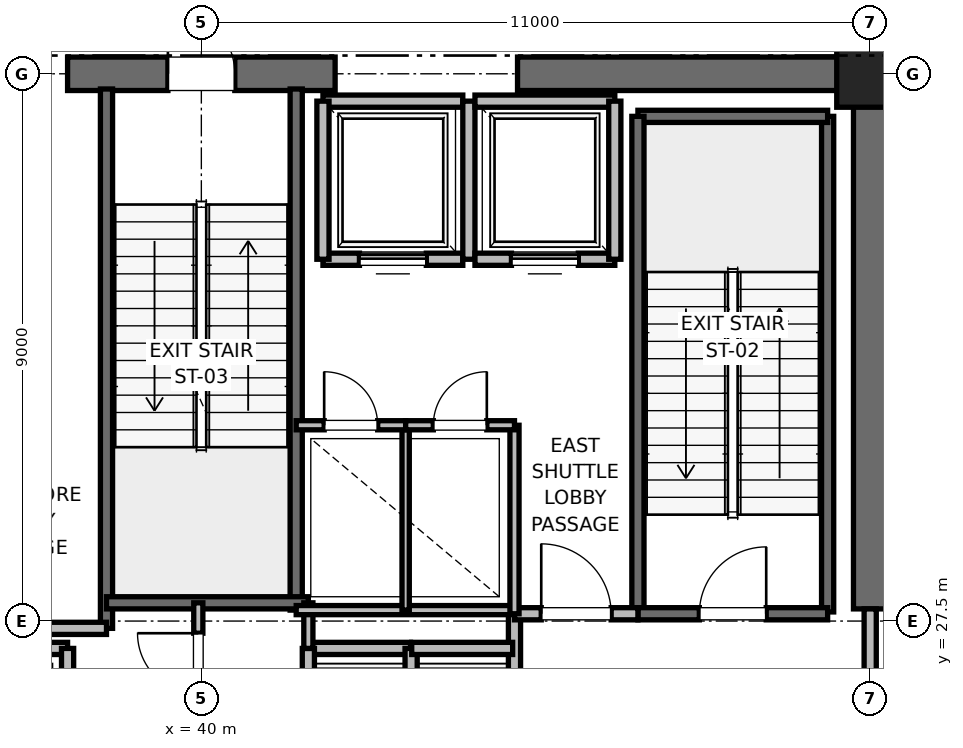
"""IFC4 building model, lengths in metres.
Left out: names, types, materials, properties, quantities, classifications, styles, units other than length and angle.
Written with IfcOpenShell. Run it as: python <this file> out.ifc"""

import sys

from ifc_helpers import new_model, si_unit, direction, frame, frame_2d, origin, origin_2d, place, context, subcontext, project, spatial, rectangle, extrude, element, fill, save


model = new_model("IFC4")
c1 = context("Model", 3, precision=1e-05, world=origin(), true_north=direction((0.0, 1.0)))
c2 = subcontext(c1, "Body", "Model", "MODEL_VIEW")
j1 = project(units=[si_unit("LENGTHUNIT", "METRE"), si_unit("PLANEANGLEUNIT", "RADIAN")], contexts=[c1])
p1 = place(None, origin())
s1 = spatial("IfcSite", under=j1, at=p1, CompositionType="ELEMENT")
p2 = place(p1, origin())
s2 = spatial("IfcBuilding", under=s1, at=p2, CompositionType="ELEMENT")
p3 = place(p2, frame((0.0, 0.0, 118.4)))
s3 = spatial("IfcBuildingStorey", under=s2, at=p3, CompositionType="ELEMENT", Elevation=118.4)
p4 = place(p3, frame((51.0, 36.5, 0.0), z_axis=(0.0, 0.0, 1.0), x_axis=(1.0, 0.0, 0.0)))
e1 = element("IfcColumn", 1, at=p4, inside=s3, PredefinedType="PILASTER", context=c2, shape_type="SweptSolid", body=[
    extrude(rectangle(XDim=1.1, YDim=1.1, at=origin_2d()), origin(), (0.0, 0.0, 1.0), 5.0),
])
p5 = place(p3, frame((37.8, 36.5, 0.0), z_axis=(0.0, 0.0, 1.0), x_axis=(1.0, 0.0, 0.0)))
e2 = element("IfcWall", 2, at=p5, inside=s3, PredefinedType="SHEAR", context=c2, shape_type="SweptSolid", body=[
    extrude(rectangle(XDim=4.4, YDim=0.55, at=frame_2d((2.2, 0.0))), origin(), (0.0, 0.0, 1.0), 4.7),
])
p6 = place(p5, frame((1.65, 0.0, 0.0)))
e3 = element("IfcOpeningElement", 3, at=p6, cuts=e2, PredefinedType="OPENING", context=c2, shape_type="SweptSolid", body=[
    extrude(rectangle(XDim=1.1, YDim=2.15, at=frame_2d((0.55, 1.075))), frame((0.0, 0.275, 0.0), z_axis=(0.0, -1.0, 0.0), x_axis=(1.0, 0.0, 0.0)), (0.0, 0.0, 1.0), 0.55),
])
p7 = place(p3, frame((45.2, 36.5, 0.0), z_axis=(0.0, 0.0, 1.0), x_axis=(1.0, 0.0, 0.0)))
e4 = element("IfcWall", 4, at=p7, inside=s3, PredefinedType="SHEAR", context=c2, shape_type="SweptSolid", body=[
    extrude(rectangle(XDim=5.8, YDim=0.55, at=frame_2d((2.9, 0.0))), origin(), (0.0, 0.0, 1.0), 4.7),
])
p8 = place(p3, frame((51.0, 27.7, 0.0), z_axis=(0.0, 0.0, 1.0), x_axis=(0.0, 1.0, 0.0)))
e5 = element("IfcWall", 5, at=p8, inside=s3, PredefinedType="SHEAR", context=c2, shape_type="SweptSolid", body=[
    extrude(rectangle(XDim=8.8, YDim=0.55, at=frame_2d((4.4, 0.0))), origin(), (0.0, 0.0, 1.0), 4.7),
])
p9 = place(p3, frame((50.3, 27.65, 0.0), z_axis=(0.0, 0.0, 1.0), x_axis=(0.0, 1.0, 0.0)))
e6 = element("IfcWall", 6, at=p9, inside=s3, PredefinedType="SOLIDWALL", context=c2, shape_type="SweptSolid", body=[
    extrude(rectangle(XDim=8.15, YDim=0.2, at=frame_2d((4.075, 0.0))), origin(), (0.0, 0.0, 1.0), 4.7),
])
p10 = place(p3, frame((47.18, 35.8, 0.0), z_axis=(0.0, 0.0, 1.0), x_axis=(1.0, 0.0, 0.0)))
e7 = element("IfcWall", 7, at=p10, inside=s3, PredefinedType="SOLIDWALL", context=c2, shape_type="SweptSolid", body=[
    extrude(rectangle(XDim=3.12, YDim=0.2, at=frame_2d((1.56, 0.0))), origin(), (0.0, 0.0, 1.0), 4.7),
])
p11 = place(p3, frame((47.18, 27.62, 0.0), z_axis=(0.0, 0.0, 1.0), x_axis=(0.0, 1.0, 0.0)))
e8 = element("IfcWall", 8, at=p11, inside=s3, PredefinedType="SOLIDWALL", context=c2, shape_type="SweptSolid", body=[
    extrude(rectangle(XDim=8.18, YDim=0.2, at=frame_2d((4.09, 0.0))), origin(), (0.0, 0.0, 1.0), 4.7),
])
p12 = place(p3, frame((47.18, 27.62, 0.0), z_axis=(0.0, 0.0, 1.0), x_axis=(1.0, 0.0, 0.0)))
e9 = element("IfcWall", 9, at=p12, inside=s3, PredefinedType="SOLIDWALL", context=c2, shape_type="SweptSolid", body=[
    extrude(rectangle(XDim=3.12, YDim=0.2, at=frame_2d((1.56, 0.0))), origin(), (0.0, 0.0, 1.0), 4.7),
])
p13 = place(p12, frame((1.01, 0.0, 0.0)))
e10 = element("IfcOpeningElement", 10, at=p13, cuts=e9, PredefinedType="OPENING", context=c2, shape_type="SweptSolid", body=[
    extrude(rectangle(XDim=1.1, YDim=2.15, at=frame_2d((0.55, 1.075))), frame((0.0, 0.1, 0.0), z_axis=(0.0, -1.0, 0.0), x_axis=(1.0, 0.0, 0.0)), (0.0, 0.0, 1.0), 0.2),
])
p14 = place(p3, frame((38.44, 27.38, 0.0), z_axis=(0.0, 0.0, 1.0), x_axis=(0.0, 1.0, 0.0)))
e11 = element("IfcWall", 11, at=p14, inside=s3, PredefinedType="SOLIDWALL", context=c2, shape_type="SweptSolid", body=[
    extrude(rectangle(XDim=8.87, YDim=0.2, at=frame_2d((4.435, 0.0))), origin(), (0.0, 0.0, 1.0), 4.7),
])
p15 = place(p3, frame((41.56, 27.68, 0.0), z_axis=(0.0, 0.0, 1.0), x_axis=(0.0, 1.0, 0.0)))
e12 = element("IfcWall", 12, at=p15, inside=s3, PredefinedType="SOLIDWALL", context=c2, shape_type="SweptSolid", body=[
    extrude(rectangle(XDim=8.57, YDim=0.2, at=frame_2d((4.285, 0.0))), origin(), (0.0, 0.0, 1.0), 4.7),
])
p16 = place(p3, frame((38.44, 27.8, 0.0), z_axis=(0.0, 0.0, 1.0), x_axis=(1.0, 0.0, 0.0)))
e13 = element("IfcWall", 13, at=p16, inside=s3, PredefinedType="SOLIDWALL", context=c2, shape_type="SweptSolid", body=[
    extrude(rectangle(XDim=3.32, YDim=0.2, at=frame_2d((1.66, 0.0))), origin(), (0.0, 0.0, 1.0), 4.7),
])
p17 = place(p3, frame((32.82, 27.38, 0.0), z_axis=(0.0, 0.0, 1.0), x_axis=(1.0, 0.0, 0.0)))
e14 = element("IfcWall", 14, at=p17, inside=s3, PredefinedType="PARTITIONING", context=c2, shape_type="SweptSolid", body=[
    extrude(rectangle(XDim=5.62, YDim=0.2, at=frame_2d((2.81, 0.0))), origin(), (0.0, 0.0, 1.0), 4.7),
])
p18 = place(p3, frame((45.15, 24.25, 0.0), z_axis=(0.0, 0.0, 1.0), x_axis=(0.0, 1.0, 0.0)))
e15 = element("IfcWall", 15, at=p18, inside=s3, PredefinedType="PARTITIONING", context=c2, shape_type="SweptSolid", body=[
    extrude(rectangle(XDim=3.37, YDim=0.2, at=frame_2d((1.685, 0.0))), origin(), (0.0, 0.0, 1.0), 4.7),
])
p19 = place(p3, frame((45.15, 27.62, 0.0), z_axis=(0.0, 0.0, 1.0), x_axis=(1.0, 0.0, 0.0)))
e16 = element("IfcWall", 16, at=p19, inside=s3, PredefinedType="PARTITIONING", context=c2, shape_type="SweptSolid", body=[
    extrude(rectangle(XDim=2.03, YDim=0.2, at=frame_2d((1.015, 0.0))), origin(), (0.0, 0.0, 1.0), 4.7),
])
p20 = place(p19, frame((0.44, 0.0, 0.0)))
e17 = element("IfcOpeningElement", 17, at=p20, cuts=e16, PredefinedType="OPENING", context=c2, shape_type="SweptSolid", body=[
    extrude(rectangle(XDim=1.15, YDim=2.2, at=frame_2d((0.575, 1.1))), frame((0.0, 0.1, 0.0), z_axis=(0.0, -1.0, 0.0), x_axis=(1.0, 0.0, 0.0)), (0.0, 0.0, 1.0), 0.2),
])
p21 = place(p3, frame((51.0, 24.3, 0.0), z_axis=(0.0, 0.0, 1.0), x_axis=(0.0, 1.0, 0.0)))
e18 = element("IfcWall", 18, at=p21, inside=s3, PredefinedType="PARTITIONING", context=c2, shape_type="SweptSolid", body=[
    extrude(rectangle(XDim=3.4, YDim=0.2, at=frame_2d((1.7, 0.0))), origin(), (0.0, 0.0, 1.0), 3.68),
])
p22 = place(p21, frame((1.125, 0.0, 0.0)))
e19 = element("IfcOpeningElement", 19, at=p22, cuts=e18, PredefinedType="OPENING", context=c2, shape_type="SweptSolid", body=[
    extrude(rectangle(XDim=1.15, YDim=2.2, at=frame_2d((0.575, 1.1))), frame((0.0, 0.1, 0.0), z_axis=(0.0, -1.0, 0.0), x_axis=(1.0, 0.0, 0.0)), (0.0, 0.0, 1.0), 0.2),
])
p23 = place(p3, frame((37.8, 27.05, 0.0), z_axis=(0.0, 0.0, 1.0), x_axis=(-1.0, 0.0, 0.0)))
e20 = element("IfcWall", 20, at=p23, inside=s3, PredefinedType="SOLIDWALL", context=c2, shape_type="SweptSolid", body=[
    extrude(rectangle(XDim=2.3, YDim=0.2, at=frame_2d((1.15, 0.0))), origin(), (0.0, 0.0, 1.0), 4.7),
])
p24 = place(p3, frame((37.8, 24.45, 0.0), z_axis=(0.0, 0.0, 1.0), x_axis=(0.0, 1.0, 0.0)))
e21 = element("IfcWall", 21, at=p24, inside=s3, PredefinedType="SOLIDWALL", context=c2, shape_type="SweptSolid", body=[
    extrude(rectangle(XDim=2.6, YDim=0.2, at=frame_2d((1.3, 0.0))), origin(), (0.0, 0.0, 1.0), 4.7),
])
p25 = place(p3, frame((43.44, 27.05, 0.0), z_axis=(0.0, 0.0, 1.0), x_axis=(-1.0, 0.0, 0.0)))
e22 = element("IfcWall", 22, at=p25, inside=s3, PredefinedType="SOLIDWALL", context=c2, shape_type="SweptSolid", body=[
    extrude(rectangle(XDim=1.68, YDim=0.2, at=frame_2d((0.84, 0.0))), origin(), (0.0, 0.0, 1.0), 4.7),
])
for number, where, z_axis, x_axis in (
    (23, (41.76, 27.05, 0.0), (0.0, 0.0, 1.0), (0.0, -1.0, 0.0)),
    (24, (43.45, 24.45, 0.0), (0.0, 0.0, 1.0), (0.0, 1.0, 0.0)),
):
    element("IfcWall", number, at=place(p3, frame(where, z_axis=z_axis, x_axis=x_axis)), inside=s3, PredefinedType="SOLIDWALL", context=c2, shape_type="SweptSolid", body=[
        extrude(rectangle(XDim=2.6, YDim=0.2, at=frame_2d((1.3, 0.0))), origin(), (0.0, 0.0, 1.0), 4.7),
    ])
p26 = place(p3, frame((45.12, 27.05, 0.0), z_axis=(0.0, 0.0, 1.0), x_axis=(-1.0, 0.0, 0.0)))
e25 = element("IfcWall", 25, at=p26, inside=s3, PredefinedType="SOLIDWALL", context=c2, shape_type="SweptSolid", body=[
    extrude(rectangle(XDim=1.66, YDim=0.2, at=frame_2d((0.83, 0.0))), origin(), (0.0, 0.0, 1.0), 4.7),
])
p27 = place(p3, frame((42.0, 33.45, 0.0), z_axis=(0.0, 0.0, 1.0), x_axis=(1.0, 0.0, 0.0)))
e26 = element("IfcWall", 26, at=p27, inside=s3, PredefinedType="SOLIDWALL", context=c2, shape_type="SweptSolid", body=[
    extrude(rectangle(XDim=2.3, YDim=0.2, at=frame_2d((1.15, 0.0))), origin(), (0.0, 0.0, 1.0), 4.7),
])
p28 = place(p27, frame((0.6, 0.0, 0.0)))
e27 = element("IfcOpeningElement", 27, at=p28, cuts=e26, PredefinedType="OPENING", context=c2, shape_type="SweptSolid", body=[
    extrude(rectangle(XDim=1.1, YDim=2.2, at=frame_2d((0.55, 1.1))), frame((0.0, 0.1, 0.0), z_axis=(0.0, -1.0, 0.0), x_axis=(1.0, 0.0, 0.0)), (0.0, 0.0, 1.0), 0.2),
])
p29 = place(p3, frame((44.3, 36.05, 0.0), z_axis=(0.0, 0.0, 1.0), x_axis=(-1.0, 0.0, 0.0)))
e28 = element("IfcWall", 28, at=p29, inside=s3, PredefinedType="SOLIDWALL", context=c2, shape_type="SweptSolid", body=[
    extrude(rectangle(XDim=2.3, YDim=0.2, at=frame_2d((1.15, 0.0))), origin(), (0.0, 0.0, 1.0), 3.68),
])
for number, where, z_axis, x_axis in (
    (29, (42.0, 36.05, 0.0), (0.0, 0.0, 1.0), (0.0, -1.0, 0.0)),
    (30, (44.4, 33.45, 0.0), (0.0, 0.0, 1.0), (0.0, 1.0, 0.0)),
):
    element("IfcWall", number, at=place(p3, frame(where, z_axis=z_axis, x_axis=x_axis)), inside=s3, PredefinedType="SOLIDWALL", context=c2, shape_type="SweptSolid", body=[
        extrude(rectangle(XDim=2.6, YDim=0.2, at=frame_2d((1.3, 0.0))), origin(), (0.0, 0.0, 1.0), 3.68),
    ])
p30 = place(p3, frame((44.5, 33.45, 0.0), z_axis=(0.0, 0.0, 1.0), x_axis=(1.0, 0.0, 0.0)))
e31 = element("IfcWall", 31, at=p30, inside=s3, PredefinedType="SOLIDWALL", context=c2, shape_type="SweptSolid", body=[
    extrude(rectangle(XDim=2.3, YDim=0.2, at=frame_2d((1.15, 0.0))), origin(), (0.0, 0.0, 1.0), 4.7),
])
p31 = place(p30, frame((0.6, 0.0, 0.0)))
e32 = element("IfcOpeningElement", 32, at=p31, cuts=e31, PredefinedType="OPENING", context=c2, shape_type="SweptSolid", body=[
    extrude(rectangle(XDim=1.1, YDim=2.2, at=frame_2d((0.55, 1.1))), frame((0.0, 0.1, 0.0), z_axis=(0.0, -1.0, 0.0), x_axis=(1.0, 0.0, 0.0)), (0.0, 0.0, 1.0), 0.2),
])
p32 = place(p3, frame((46.8, 36.05, 0.0), z_axis=(0.0, 0.0, 1.0), x_axis=(-1.0, 0.0, 0.0)))
e33 = element("IfcWall", 33, at=p32, inside=s3, PredefinedType="SOLIDWALL", context=c2, shape_type="SweptSolid", body=[
    extrude(rectangle(XDim=2.3, YDim=0.2, at=frame_2d((1.15, 0.0))), origin(), (0.0, 0.0, 1.0), 3.68),
])
p33 = place(p3, frame((46.8, 33.45, 0.0), z_axis=(0.0, 0.0, 1.0), x_axis=(0.0, 1.0, 0.0)))
e34 = element("IfcWall", 34, at=p33, inside=s3, PredefinedType="SOLIDWALL", context=c2, shape_type="SweptSolid", body=[
    extrude(rectangle(XDim=2.6, YDim=0.2, at=frame_2d((1.3, 0.0))), origin(), (0.0, 0.0, 1.0), 4.7),
])
p34 = place(p3, frame((41.76, 27.05, 0.0), z_axis=(0.0, 0.0, 1.0), x_axis=(0.0, 1.0, 0.0)))
e35 = element("IfcWall", 35, at=p34, inside=s3, PredefinedType="PARTITIONING", context=c2, shape_type="SweptSolid", body=[
    extrude(rectangle(XDim=0.75, YDim=0.15, at=frame_2d((0.375, 0.0))), origin(), (0.0, 0.0, 1.0), 2.85),
])
p35 = place(p3, frame((39.95, 25.8, 0.0), z_axis=(0.0, 0.0, 1.0), x_axis=(0.0, 1.0, 0.0)))
e36 = element("IfcWall", 36, at=p35, inside=s3, PredefinedType="PARTITIONING", context=c2, shape_type="SweptSolid", body=[
    extrude(rectangle(XDim=2.0, YDim=0.15, at=frame_2d((1.0, 0.0))), origin(), (0.0, 0.0, 1.0), 2.85),
])
p36 = place(p35, frame((0.5, 0.0, 0.0)))
e37 = element("IfcOpeningElement", 37, at=p36, cuts=e36, PredefinedType="OPENING", context=c2, shape_type="SweptSolid", body=[
    extrude(rectangle(XDim=1.0, YDim=2.15, at=frame_2d((0.5, 1.075))), frame((0.0, 0.075, 0.0), z_axis=(0.0, -1.0, 0.0), x_axis=(1.0, 0.0, 0.0)), (0.0, 0.0, 1.0), 0.15),
])
p37 = place(p3, frame((41.56, 27.68, 0.0), z_axis=(0.0, 0.0, 1.0), x_axis=(1.0, 0.0, 0.0)))
e38 = element("IfcWall", 38, at=p37, inside=s3, PredefinedType="PARTITIONING", context=c2, shape_type="SweptSolid", body=[
    extrude(rectangle(XDim=3.59, YDim=0.15, at=frame_2d((1.795, 0.0))), origin(), (0.0, 0.0, 1.0), 2.85),
])
p38 = place(p3, frame((45.15, 27.62, 0.0), z_axis=(0.0, 0.0, 1.0), x_axis=(0.0, 1.0, 0.0)))
e39 = element("IfcWall", 39, at=p38, inside=s3, PredefinedType="PARTITIONING", context=c2, shape_type="SweptSolid", body=[
    extrude(rectangle(XDim=3.1, YDim=0.15, at=frame_2d((1.55, 0.0))), origin(), (0.0, 0.0, 1.0), 2.85),
])
p39 = place(p3, frame((43.36, 27.68, 0.0), z_axis=(0.0, 0.0, 1.0), x_axis=(0.0, 1.0, 0.0)))
e40 = element("IfcWall", 40, at=p39, inside=s3, PredefinedType="PARTITIONING", context=c2, shape_type="SweptSolid", body=[
    extrude(rectangle(XDim=3.04, YDim=0.12, at=frame_2d((1.52, 0.0))), origin(), (0.0, 0.0, 1.0), 2.85),
])
p40 = place(p3, frame((41.56, 30.72, 0.0), z_axis=(0.0, 0.0, 1.0), x_axis=(1.0, 0.0, 0.0)))
e41 = element("IfcWall", 41, at=p40, inside=s3, PredefinedType="PARTITIONING", context=c2, shape_type="SweptSolid", body=[
    extrude(rectangle(XDim=1.8, YDim=0.15, at=frame_2d((0.9, 0.0))), origin(), (0.0, 0.0, 1.0), 2.85),
])
p41 = place(p40, frame((0.46, 0.0, 0.0)))
e42 = element("IfcOpeningElement", 42, at=p41, cuts=e41, PredefinedType="OPENING", context=c2, shape_type="SweptSolid", body=[
    extrude(rectangle(XDim=0.88, YDim=2.1, at=frame_2d((0.44, 1.05))), frame((0.0, 0.075, 0.0), z_axis=(0.0, -1.0, 0.0), x_axis=(1.0, 0.0, 0.0)), (0.0, 0.0, 1.0), 0.15),
])
p42 = place(p3, frame((43.36, 30.72, 0.0), z_axis=(0.0, 0.0, 1.0), x_axis=(1.0, 0.0, 0.0)))
e43 = element("IfcWall", 43, at=p42, inside=s3, PredefinedType="PARTITIONING", context=c2, shape_type="SweptSolid", body=[
    extrude(rectangle(XDim=1.79, YDim=0.15, at=frame_2d((0.895, 0.0))), origin(), (0.0, 0.0, 1.0), 2.85),
])
p43 = place(p42, frame((0.455, 0.0, 0.0)))
e44 = element("IfcOpeningElement", 44, at=p43, cuts=e43, PredefinedType="OPENING", context=c2, shape_type="SweptSolid", body=[
    extrude(rectangle(XDim=0.88, YDim=2.1, at=frame_2d((0.44, 1.05))), frame((0.0, 0.075, 0.0), z_axis=(0.0, -1.0, 0.0), x_axis=(1.0, 0.0, 0.0)), (0.0, 0.0, 1.0), 0.15),
])
p44 = place(p13, origin())
e45 = element("IfcDoor", 45, at=p44, inside=s3, OperationType="SINGLE_SWING_RIGHT", PredefinedType="DOOR", context=c2, shape_type="SweptSolid", body=[
    extrude(rectangle(XDim=1.1, YDim=2.15, at=frame_2d((0.55, 1.075))), frame((0.0, 0.025, 0.0), z_axis=(0.0, -1.0, 0.0), x_axis=(1.0, 0.0, 0.0)), (0.0, 0.0, 1.0), 0.05),
])
fill(e10, e45)
p45 = place(p6, origin())
e46 = element("IfcDoor", 46, at=p45, inside=s3, OperationType="SINGLE_SWING_LEFT", PredefinedType="DOOR", context=c2, shape_type="SweptSolid", body=[
    extrude(rectangle(XDim=1.1, YDim=2.15, at=frame_2d((0.55, 1.075))), frame((0.0, 0.025, 0.0), z_axis=(0.0, -1.0, 0.0), x_axis=(1.0, 0.0, 0.0)), (0.0, 0.0, 1.0), 0.05),
])
fill(e3, e46)
p46 = place(p20, origin())
e47 = element("IfcDoor", 47, at=p46, inside=s3, OperationType="SINGLE_SWING_LEFT", PredefinedType="DOOR", context=c2, shape_type="SweptSolid", body=[
    extrude(rectangle(XDim=1.15, YDim=2.2, at=frame_2d((0.575, 1.1))), frame((0.0, 0.025, 0.0), z_axis=(0.0, -1.0, 0.0), x_axis=(1.0, 0.0, 0.0)), (0.0, 0.0, 1.0), 0.05),
])
fill(e17, e47)
p47 = place(p28, origin())
e48 = element("IfcDoor", 48, at=p47, inside=s3, OperationType="SLIDING_TO_RIGHT", PredefinedType="DOOR", context=c2, shape_type="SweptSolid", body=[
    extrude(rectangle(XDim=1.1, YDim=2.2, at=frame_2d((0.55, 1.1))), frame((0.0, 0.025, 0.0), z_axis=(0.0, -1.0, 0.0), x_axis=(1.0, 0.0, 0.0)), (0.0, 0.0, 1.0), 0.05),
])
fill(e27, e48)
p48 = place(p31, origin())
e49 = element("IfcDoor", 49, at=p48, inside=s3, OperationType="SLIDING_TO_RIGHT", PredefinedType="DOOR", context=c2, shape_type="SweptSolid", body=[
    extrude(rectangle(XDim=1.1, YDim=2.2, at=frame_2d((0.55, 1.1))), frame((0.0, 0.025, 0.0), z_axis=(0.0, -1.0, 0.0), x_axis=(1.0, 0.0, 0.0)), (0.0, 0.0, 1.0), 0.05),
])
fill(e32, e49)
p49 = place(p36, origin())
e50 = element("IfcDoor", 50, at=p49, inside=s3, OperationType="SINGLE_SWING_RIGHT", PredefinedType="DOOR", context=c2, shape_type="SweptSolid", body=[
    extrude(rectangle(XDim=1.0, YDim=2.15, at=frame_2d((0.5, 1.075))), frame((0.0, 0.025, 0.0), z_axis=(0.0, -1.0, 0.0), x_axis=(1.0, 0.0, 0.0)), (0.0, 0.0, 1.0), 0.05),
])
fill(e37, e50)
p50 = place(p41, origin())
e51 = element("IfcDoor", 51, at=p50, inside=s3, OperationType="SINGLE_SWING_LEFT", PredefinedType="DOOR", context=c2, shape_type="SweptSolid", body=[
    extrude(rectangle(XDim=0.88, YDim=2.1, at=frame_2d((0.44, 1.05))), frame((0.0, 0.025, 0.0), z_axis=(0.0, -1.0, 0.0), x_axis=(1.0, 0.0, 0.0)), (0.0, 0.0, 1.0), 0.05),
])
fill(e42, e51)
p51 = place(p43, origin())
e52 = element("IfcDoor", 52, at=p51, inside=s3, OperationType="SINGLE_SWING_RIGHT", PredefinedType="DOOR", context=c2, shape_type="SweptSolid", body=[
    extrude(rectangle(XDim=0.88, YDim=2.1, at=frame_2d((0.44, 1.05))), frame((0.0, 0.025, 0.0), z_axis=(0.0, -1.0, 0.0), x_axis=(1.0, 0.0, 0.0)), (0.0, 0.0, 1.0), 0.05),
])
fill(e44, e52)
save(model, sys.argv[1])
